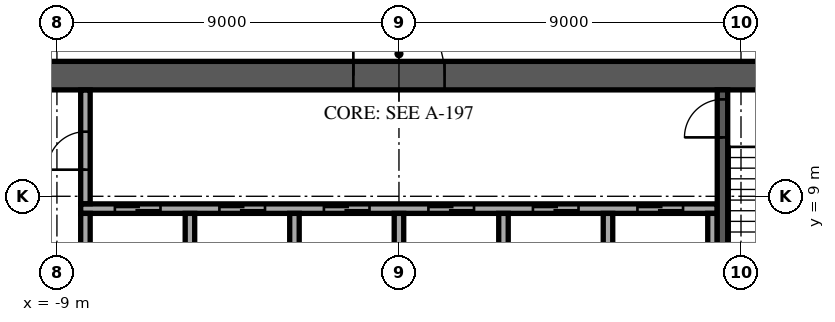
"""IFC4 building model, lengths in metres.
Left out: names, types, materials, properties, quantities, classifications, styles, units other than length and angle.
Written with IfcOpenShell. Run it as: python <this file> out.ifc"""

import sys

from ifc_helpers import new_model, si_unit, direction, frame, frame_2d, origin, place, context, subcontext, project, spatial, rectangle, extrude, element, fill, save


model = new_model("IFC4")
c1 = context("Model", 3, precision=1e-05, world=origin(), true_north=direction((0.0, 1.0)))
c2 = subcontext(c1, "Body", "Model", "MODEL_VIEW")
j1 = project(units=[si_unit("LENGTHUNIT", "METRE"), si_unit("PLANEANGLEUNIT", "RADIAN")], contexts=[c1])
p1 = place(None, origin())
s1 = spatial("IfcSite", under=j1, at=p1, CompositionType="ELEMENT")
p2 = place(p1, origin())
s2 = spatial("IfcBuilding", under=s1, at=p2, CompositionType="ELEMENT")
p3 = place(p2, frame((0.0, 0.0, 254.9)))
s3 = spatial("IfcBuildingStorey", under=s2, at=p3, CompositionType="ELEMENT", Elevation=254.9)
p4 = place(p3, frame((-12.55, 12.175, 0.0), z_axis=(0.0, 0.0, 1.0), x_axis=(1.0, 0.0, 0.0)))
e1 = element("IfcWall", 1, at=p4, inside=s3, PredefinedType="SHEAR", context=c2, shape_type="SweptSolid", body=[
    extrude(rectangle(XDim=25.1, YDim=0.75, at=frame_2d((12.55, 0.0))), origin(), (0.0, 0.0, 1.0), 3.64),
])
p5 = place(p4, frame((11.35, 0.0, 0.0)))
e2 = element("IfcOpeningElement", 2, at=p5, cuts=e1, PredefinedType="OPENING", context=c2, shape_type="SweptSolid", body=[
    extrude(rectangle(XDim=2.4, YDim=2.4, at=frame_2d((1.2, 1.2))), frame((0.0, 0.385, 0.0), z_axis=(0.0, -1.0, 0.0), x_axis=(1.0, 0.0, 0.0)), (0.0, 0.0, 1.0), 0.77),
])
p6 = place(p4, frame((22.175, 0.0, 0.0)))
e3 = element("IfcOpeningElement", 3, at=p6, cuts=e1, PredefinedType="OPENING", context=c2, shape_type="SweptSolid", body=[
    extrude(rectangle(XDim=1.2, YDim=2.1, at=frame_2d((0.6, 1.05))), frame((0.0, 0.385, 0.0), z_axis=(0.0, -1.0, 0.0), x_axis=(1.0, 0.0, 0.0)), (0.0, 0.0, 1.0), 0.77),
])
p7 = place(p4, frame((1.15, 0.0, 0.0)))
e4 = element("IfcOpeningElement", 4, at=p7, cuts=e1, PredefinedType="OPENING", context=c2, shape_type="SweptSolid", body=[
    extrude(rectangle(XDim=1.0, YDim=2.1, at=frame_2d((0.5, 1.05))), frame((0.0, 0.385, 0.0), z_axis=(0.0, -1.0, 0.0), x_axis=(1.0, 0.0, 0.0)), (0.0, 0.0, 1.0), 0.77),
])
p8 = place(p3, frame((-8.375, 8.675, 0.0), z_axis=(0.0, 0.0, 1.0), x_axis=(1.0, 0.0, 0.0)))
e5 = element("IfcWall", 5, at=p8, inside=s3, PredefinedType="SOLIDWALL", context=c2, shape_type="SweptSolid", body=[
    extrude(rectangle(XDim=16.75, YDim=0.25, at=frame_2d((8.375, 0.0))), origin(), (0.0, 0.0, 1.0), 3.64),
])
p9 = place(p8, frame((0.9, 0.0, 0.0)))
e6 = element("IfcOpeningElement", 6, at=p9, cuts=e5, PredefinedType="OPENING", context=c2, shape_type="SweptSolid", body=[
    extrude(rectangle(XDim=1.2, YDim=2.1, at=frame_2d((0.6, 1.05))), frame((0.0, 0.135, 0.0), z_axis=(0.0, -1.0, 0.0), x_axis=(1.0, 0.0, 0.0)), (0.0, 0.0, 1.0), 0.27),
])
p10 = place(p8, frame((3.65, 0.0, 0.0)))
e7 = element("IfcOpeningElement", 7, at=p10, cuts=e5, PredefinedType="OPENING", context=c2, shape_type="SweptSolid", body=[
    extrude(rectangle(XDim=1.2, YDim=2.1, at=frame_2d((0.6, 1.05))), frame((0.0, 0.135, 0.0), z_axis=(0.0, -1.0, 0.0), x_axis=(1.0, 0.0, 0.0)), (0.0, 0.0, 1.0), 0.27),
])
p11 = place(p8, frame((6.4, 0.0, 0.0)))
e8 = element("IfcOpeningElement", 8, at=p11, cuts=e5, PredefinedType="OPENING", context=c2, shape_type="SweptSolid", body=[
    extrude(rectangle(XDim=1.2, YDim=2.1, at=frame_2d((0.6, 1.05))), frame((0.0, 0.135, 0.0), z_axis=(0.0, -1.0, 0.0), x_axis=(1.0, 0.0, 0.0)), (0.0, 0.0, 1.0), 0.27),
])
p12 = place(p8, frame((9.15, 0.0, 0.0)))
e9 = element("IfcOpeningElement", 9, at=p12, cuts=e5, PredefinedType="OPENING", context=c2, shape_type="SweptSolid", body=[
    extrude(rectangle(XDim=1.2, YDim=2.1, at=frame_2d((0.6, 1.05))), frame((0.0, 0.135, 0.0), z_axis=(0.0, -1.0, 0.0), x_axis=(1.0, 0.0, 0.0)), (0.0, 0.0, 1.0), 0.27),
])
p13 = place(p8, frame((11.9, 0.0, 0.0)))
e10 = element("IfcOpeningElement", 10, at=p13, cuts=e5, PredefinedType="OPENING", context=c2, shape_type="SweptSolid", body=[
    extrude(rectangle(XDim=1.2, YDim=2.1, at=frame_2d((0.6, 1.05))), frame((0.0, 0.135, 0.0), z_axis=(0.0, -1.0, 0.0), x_axis=(1.0, 0.0, 0.0)), (0.0, 0.0, 1.0), 0.27),
])
p14 = place(p8, frame((14.65, 0.0, 0.0)))
e11 = element("IfcOpeningElement", 11, at=p14, cuts=e5, PredefinedType="OPENING", context=c2, shape_type="SweptSolid", body=[
    extrude(rectangle(XDim=1.2, YDim=2.1, at=frame_2d((0.6, 1.05))), frame((0.0, 0.135, 0.0), z_axis=(0.0, -1.0, 0.0), x_axis=(1.0, 0.0, 0.0)), (0.0, 0.0, 1.0), 0.27),
])
for number, where, z_axis, x_axis in (
    (12, (-8.25, 5.85, 0.0), (0.0, 0.0, 1.0), (0.0, 1.0, 0.0)),
    (13, (-5.5, 5.85, 0.0), (0.0, 0.0, 1.0), (0.0, 1.0, 0.0)),
    (14, (-2.75, 5.85, 0.0), (0.0, 0.0, 1.0), (0.0, 1.0, 0.0)),
    (15, (0.0, 5.85, 0.0), (0.0, 0.0, 1.0), (0.0, 1.0, 0.0)),
    (16, (2.75, 5.85, 0.0), (0.0, 0.0, 1.0), (0.0, 1.0, 0.0)),
    (17, (5.5, 5.85, 0.0), (0.0, 0.0, 1.0), (0.0, 1.0, 0.0)),
    (18, (8.25, 5.85, 0.0), (0.0, 0.0, 1.0), (0.0, 1.0, 0.0)),
):
    element("IfcWall", number, at=place(p3, frame(where, z_axis=z_axis, x_axis=x_axis)), inside=s3, PredefinedType="SOLIDWALL", context=c2, shape_type="SweptSolid", body=[
        extrude(rectangle(XDim=2.7, YDim=0.25, at=frame_2d((1.35, 0.0))), origin(), (0.0, 0.0, 1.0), 3.64),
    ])
p15 = place(p3, frame((8.512, 4.55, 0.0), z_axis=(0.0, 0.0, 1.0), x_axis=(0.0, 1.0, 0.0)))
e19 = element("IfcWall", 19, at=p15, inside=s3, PredefinedType="SOLIDWALL", context=c2, shape_type="SweptSolid", body=[
    extrude(rectangle(XDim=7.25, YDim=0.275, at=frame_2d((3.625, 0.0))), origin(), (0.0, 0.0, 1.0), 3.64),
])
p16 = place(p15, frame((6.0, 0.0, 0.0)))
e20 = element("IfcOpeningElement", 20, at=p16, cuts=e19, PredefinedType="OPENING", context=c2, shape_type="SweptSolid", body=[
    extrude(rectangle(XDim=1.0, YDim=2.1, at=frame_2d((0.5, 1.05))), frame((0.0, 0.147, 0.0), z_axis=(0.0, -1.0, 0.0), x_axis=(1.0, 0.0, 0.0)), (0.0, 0.0, 1.0), 0.295),
])
p17 = place(p3, frame((-8.25, 8.805, 0.0), z_axis=(0.0, 0.0, 1.0), x_axis=(0.0, 1.0, 0.0)))
e21 = element("IfcWall", 21, at=p17, inside=s3, PredefinedType="PARTITIONING", context=c2, shape_type="SweptSolid", body=[
    extrude(rectangle(XDim=2.99, YDim=0.25, at=frame_2d((1.495, 0.0))), origin(), (0.0, 0.0, 1.0), 3.64),
])
p18 = place(p17, frame((0.895, 0.0, 0.0)))
e22 = element("IfcOpeningElement", 22, at=p18, cuts=e21, PredefinedType="OPENING", context=c2, shape_type="SweptSolid", body=[
    extrude(rectangle(XDim=1.0, YDim=2.1, at=frame_2d((0.5, 1.05))), frame((0.0, 0.135, 0.0), z_axis=(0.0, -1.0, 0.0), x_axis=(1.0, 0.0, 0.0)), (0.0, 0.0, 1.0), 0.27),
])
p19 = place(p3, frame((-6.281, 33.292, 0.0), z_axis=(0.0, 0.0, 1.0), x_axis=(-0.544637268583, -0.838671715077, 0.0)))
e23 = element("IfcWall", 23, at=p19, inside=s3, PredefinedType="STANDARD", context=c2, shape_type="SweptSolid", body=[
    extrude(rectangle(XDim=48.843, YDim=0.6, at=frame_2d((24.422, 0.0))), origin(), (0.0, 0.0, 1.0), 3.64),
])
p20 = place(p19, frame((1.22, 0.0, 0.9)))
e24 = element("IfcOpeningElement", 24, at=p20, cuts=e23, PredefinedType="OPENING", context=c2, shape_type="SweptSolid", body=[
    extrude(rectangle(XDim=2.0, YDim=2.1, at=frame_2d((1.0, 1.05))), frame((0.0, 0.31, 0.0), z_axis=(0.0, -1.0, 0.0), x_axis=(1.0, 0.0, 0.0)), (0.0, 0.0, 1.0), 0.62),
])
p21 = place(p19, frame((5.66, 0.0, 0.9)))
e25 = element("IfcOpeningElement", 25, at=p21, cuts=e23, PredefinedType="OPENING", context=c2, shape_type="SweptSolid", body=[
    extrude(rectangle(XDim=2.0, YDim=2.1, at=frame_2d((1.0, 1.05))), frame((0.0, 0.31, 0.0), z_axis=(0.0, -1.0, 0.0), x_axis=(1.0, 0.0, 0.0)), (0.0, 0.0, 1.0), 0.62),
])
p22 = place(p19, frame((14.541, 0.0, 0.9)))
e26 = element("IfcOpeningElement", 26, at=p22, cuts=e23, PredefinedType="OPENING", context=c2, shape_type="SweptSolid", body=[
    extrude(rectangle(XDim=2.0, YDim=2.1, at=frame_2d((1.0, 1.05))), frame((0.0, 0.31, 0.0), z_axis=(0.0, -1.0, 0.0), x_axis=(1.0, 0.0, 0.0)), (0.0, 0.0, 1.0), 0.62),
])
p23 = place(p19, frame((18.981, 0.0, 0.9)))
e27 = element("IfcOpeningElement", 27, at=p23, cuts=e23, PredefinedType="OPENING", context=c2, shape_type="SweptSolid", body=[
    extrude(rectangle(XDim=2.0, YDim=2.1, at=frame_2d((1.0, 1.05))), frame((0.0, 0.31, 0.0), z_axis=(0.0, -1.0, 0.0), x_axis=(1.0, 0.0, 0.0)), (0.0, 0.0, 1.0), 0.62),
])
p24 = place(p19, frame((23.422, 0.0, 0.9)))
e28 = element("IfcOpeningElement", 28, at=p24, cuts=e23, PredefinedType="OPENING", context=c2, shape_type="SweptSolid", body=[
    extrude(rectangle(XDim=2.0, YDim=2.1, at=frame_2d((1.0, 1.05))), frame((0.0, 0.31, 0.0), z_axis=(0.0, -1.0, 0.0), x_axis=(1.0, 0.0, 0.0)), (0.0, 0.0, 1.0), 0.62),
])
p25 = place(p19, frame((27.862, 0.0, 0.9)))
e29 = element("IfcOpeningElement", 29, at=p25, cuts=e23, PredefinedType="OPENING", context=c2, shape_type="SweptSolid", body=[
    extrude(rectangle(XDim=2.0, YDim=2.1, at=frame_2d((1.0, 1.05))), frame((0.0, 0.31, 0.0), z_axis=(0.0, -1.0, 0.0), x_axis=(1.0, 0.0, 0.0)), (0.0, 0.0, 1.0), 0.62),
])
p26 = place(p19, frame((32.302, 0.0, 0.9)))
e30 = element("IfcOpeningElement", 30, at=p26, cuts=e23, PredefinedType="OPENING", context=c2, shape_type="SweptSolid", body=[
    extrude(rectangle(XDim=2.0, YDim=2.1, at=frame_2d((1.0, 1.05))), frame((0.0, 0.31, 0.0), z_axis=(0.0, -1.0, 0.0), x_axis=(1.0, 0.0, 0.0)), (0.0, 0.0, 1.0), 0.62),
])
p27 = place(p19, frame((36.742, 0.0, 0.9)))
e31 = element("IfcOpeningElement", 31, at=p27, cuts=e23, PredefinedType="OPENING", context=c2, shape_type="SweptSolid", body=[
    extrude(rectangle(XDim=2.0, YDim=2.1, at=frame_2d((1.0, 1.05))), frame((0.0, 0.31, 0.0), z_axis=(0.0, -1.0, 0.0), x_axis=(1.0, 0.0, 0.0)), (0.0, 0.0, 1.0), 0.62),
])
p28 = place(p19, frame((41.183, 0.0, 0.9)))
e32 = element("IfcOpeningElement", 32, at=p28, cuts=e23, PredefinedType="OPENING", context=c2, shape_type="SweptSolid", body=[
    extrude(rectangle(XDim=2.0, YDim=2.1, at=frame_2d((1.0, 1.05))), frame((0.0, 0.31, 0.0), z_axis=(0.0, -1.0, 0.0), x_axis=(1.0, 0.0, 0.0)), (0.0, 0.0, 1.0), 0.62),
])
p29 = place(p19, frame((45.623, 0.0, 0.9)))
e33 = element("IfcOpeningElement", 33, at=p29, cuts=e23, PredefinedType="OPENING", context=c2, shape_type="SweptSolid", body=[
    extrude(rectangle(XDim=2.0, YDim=2.1, at=frame_2d((1.0, 1.05))), frame((0.0, 0.31, 0.0), z_axis=(0.0, -1.0, 0.0), x_axis=(1.0, 0.0, 0.0)), (0.0, 0.0, 1.0), 0.62),
])
p30 = place(p3, frame((6.367, -33.16, 0.0), z_axis=(0.0, 0.0, 1.0), x_axis=(0.544637371147, 0.838671648472, 0.0)))
e34 = element("IfcWall", 34, at=p30, inside=s3, PredefinedType="STANDARD", context=c2, shape_type="SweptSolid", body=[
    extrude(rectangle(XDim=48.686, YDim=0.6, at=frame_2d((24.343, 0.0))), origin(), (0.0, 0.0, 1.0), 3.64),
])
p31 = place(p30, frame((1.213, 0.0, 0.9)))
e35 = element("IfcOpeningElement", 35, at=p31, cuts=e34, PredefinedType="OPENING", context=c2, shape_type="SweptSolid", body=[
    extrude(rectangle(XDim=2.0, YDim=2.1, at=frame_2d((1.0, 1.05))), frame((0.0, 0.31, 0.0), z_axis=(0.0, -1.0, 0.0), x_axis=(1.0, 0.0, 0.0)), (0.0, 0.0, 1.0), 0.62),
])
p32 = place(p30, frame((5.639, 0.0, 0.9)))
e36 = element("IfcOpeningElement", 36, at=p32, cuts=e34, PredefinedType="OPENING", context=c2, shape_type="SweptSolid", body=[
    extrude(rectangle(XDim=2.0, YDim=2.1, at=frame_2d((1.0, 1.05))), frame((0.0, 0.31, 0.0), z_axis=(0.0, -1.0, 0.0), x_axis=(1.0, 0.0, 0.0)), (0.0, 0.0, 1.0), 0.62),
])
p33 = place(p30, frame((14.491, 0.0, 0.9)))
e37 = element("IfcOpeningElement", 37, at=p33, cuts=e34, PredefinedType="OPENING", context=c2, shape_type="SweptSolid", body=[
    extrude(rectangle(XDim=2.0, YDim=2.1, at=frame_2d((1.0, 1.05))), frame((0.0, 0.31, 0.0), z_axis=(0.0, -1.0, 0.0), x_axis=(1.0, 0.0, 0.0)), (0.0, 0.0, 1.0), 0.62),
])
p34 = place(p30, frame((18.917, 0.0, 0.9)))
e38 = element("IfcOpeningElement", 38, at=p34, cuts=e34, PredefinedType="OPENING", context=c2, shape_type="SweptSolid", body=[
    extrude(rectangle(XDim=2.0, YDim=2.1, at=frame_2d((1.0, 1.05))), frame((0.0, 0.31, 0.0), z_axis=(0.0, -1.0, 0.0), x_axis=(1.0, 0.0, 0.0)), (0.0, 0.0, 1.0), 0.62),
])
p35 = place(p30, frame((23.343, 0.0, 0.9)))
e39 = element("IfcOpeningElement", 39, at=p35, cuts=e34, PredefinedType="OPENING", context=c2, shape_type="SweptSolid", body=[
    extrude(rectangle(XDim=2.0, YDim=2.1, at=frame_2d((1.0, 1.05))), frame((0.0, 0.31, 0.0), z_axis=(0.0, -1.0, 0.0), x_axis=(1.0, 0.0, 0.0)), (0.0, 0.0, 1.0), 0.62),
])
p36 = place(p30, frame((27.769, 0.0, 0.9)))
e40 = element("IfcOpeningElement", 40, at=p36, cuts=e34, PredefinedType="OPENING", context=c2, shape_type="SweptSolid", body=[
    extrude(rectangle(XDim=2.0, YDim=2.1, at=frame_2d((1.0, 1.05))), frame((0.0, 0.31, 0.0), z_axis=(0.0, -1.0, 0.0), x_axis=(1.0, 0.0, 0.0)), (0.0, 0.0, 1.0), 0.62),
])
p37 = place(p30, frame((32.195, 0.0, 0.9)))
e41 = element("IfcOpeningElement", 41, at=p37, cuts=e34, PredefinedType="OPENING", context=c2, shape_type="SweptSolid", body=[
    extrude(rectangle(XDim=2.0, YDim=2.1, at=frame_2d((1.0, 1.05))), frame((0.0, 0.31, 0.0), z_axis=(0.0, -1.0, 0.0), x_axis=(1.0, 0.0, 0.0)), (0.0, 0.0, 1.0), 0.62),
])
p38 = place(p30, frame((36.621, 0.0, 0.9)))
e42 = element("IfcOpeningElement", 42, at=p38, cuts=e34, PredefinedType="OPENING", context=c2, shape_type="SweptSolid", body=[
    extrude(rectangle(XDim=2.0, YDim=2.1, at=frame_2d((1.0, 1.05))), frame((0.0, 0.31, 0.0), z_axis=(0.0, -1.0, 0.0), x_axis=(1.0, 0.0, 0.0)), (0.0, 0.0, 1.0), 0.62),
])
p39 = place(p30, frame((41.047, 0.0, 0.9)))
e43 = element("IfcOpeningElement", 43, at=p39, cuts=e34, PredefinedType="OPENING", context=c2, shape_type="SweptSolid", body=[
    extrude(rectangle(XDim=2.0, YDim=2.1, at=frame_2d((1.0, 1.05))), frame((0.0, 0.31, 0.0), z_axis=(0.0, -1.0, 0.0), x_axis=(1.0, 0.0, 0.0)), (0.0, 0.0, 1.0), 0.62),
])
p40 = place(p30, frame((45.473, 0.0, 0.9)))
e44 = element("IfcOpeningElement", 44, at=p40, cuts=e34, PredefinedType="OPENING", context=c2, shape_type="SweptSolid", body=[
    extrude(rectangle(XDim=2.0, YDim=2.1, at=frame_2d((1.0, 1.05))), frame((0.0, 0.31, 0.0), z_axis=(0.0, -1.0, 0.0), x_axis=(1.0, 0.0, 0.0)), (0.0, 0.0, 1.0), 0.62),
])
p41 = place(p3, frame((-6.127, 26.598, 0.0), z_axis=(0.0, 0.0, 1.0), x_axis=(0.838670911559, -0.544638505897, 0.0)))
e45 = element("IfcWall", 45, at=p41, inside=s3, PredefinedType="PARTITIONING", context=c2, shape_type="SweptSolid", body=[
    extrude(rectangle(XDim=39.325, YDim=0.15, at=frame_2d((19.663, 0.0))), origin(), (0.0, 0.0, 1.0), 3.04),
])
p42 = place(p41, frame((9.3, 0.0, 0.0)))
e46 = element("IfcOpeningElement", 46, at=p42, cuts=e45, PredefinedType="OPENING", context=c2, shape_type="SweptSolid", body=[
    extrude(rectangle(XDim=1.8, YDim=2.1, at=frame_2d((0.9, 1.05))), frame((0.0, 0.085, 0.0), z_axis=(0.0, -1.0, 0.0), x_axis=(1.0, 0.0, 0.0)), (0.0, 0.0, 1.0), 0.17),
])
p43 = place(p41, frame((12.185, 0.0, 0.0)))
e47 = element("IfcOpeningElement", 47, at=p43, cuts=e45, PredefinedType="OPENING", context=c2, shape_type="SweptSolid", body=[
    extrude(rectangle(XDim=1.0, YDim=2.1, at=frame_2d((0.5, 1.05))), frame((0.0, 0.085, 0.0), z_axis=(0.0, -1.0, 0.0), x_axis=(1.0, 0.0, 0.0)), (0.0, 0.0, 1.0), 0.17),
])
p44 = place(p41, frame((23.155, 0.0, 0.0)))
e48 = element("IfcOpeningElement", 48, at=p44, cuts=e45, PredefinedType="OPENING", context=c2, shape_type="SweptSolid", body=[
    extrude(rectangle(XDim=1.0, YDim=2.1, at=frame_2d((0.5, 1.05))), frame((0.0, 0.085, 0.0), z_axis=(0.0, -1.0, 0.0), x_axis=(1.0, 0.0, 0.0)), (0.0, 0.0, 1.0), 0.17),
])
p45 = place(p41, frame((30.544, 0.0, 0.0)))
e49 = element("IfcOpeningElement", 49, at=p45, cuts=e45, PredefinedType="OPENING", context=c2, shape_type="SweptSolid", body=[
    extrude(rectangle(XDim=1.0, YDim=2.1, at=frame_2d((0.5, 1.05))), frame((0.0, 0.085, 0.0), z_axis=(0.0, -1.0, 0.0), x_axis=(1.0, 0.0, 0.0)), (0.0, 0.0, 1.0), 0.17),
])
p46 = place(p41, frame((36.099, 0.0, 0.0)))
e50 = element("IfcOpeningElement", 50, at=p46, cuts=e45, PredefinedType="OPENING", context=c2, shape_type="SweptSolid", body=[
    extrude(rectangle(XDim=1.0, YDim=2.1, at=frame_2d((0.5, 1.05))), frame((0.0, 0.085, 0.0), z_axis=(0.0, -1.0, 0.0), x_axis=(1.0, 0.0, 0.0)), (0.0, 0.0, 1.0), 0.17),
])
p47 = place(p5, origin())
e51 = element("IfcDoor", 51, at=p47, inside=s3, OperationType="SINGLE_SWING_LEFT", PredefinedType="DOOR", context=c2, shape_type="SweptSolid", body=[
    extrude(rectangle(XDim=2.4, YDim=2.4, at=frame_2d((1.2, 1.2))), frame((0.0, 0.025, 0.0), z_axis=(0.0, -1.0, 0.0), x_axis=(1.0, 0.0, 0.0)), (0.0, 0.0, 1.0), 0.05),
])
fill(e2, e51)
p48 = place(p9, origin())
e52 = element("IfcDoor", 52, at=p48, inside=s3, OperationType="DOUBLE_DOOR_SLIDING", PredefinedType="DOOR", context=c2, shape_type="SweptSolid", body=[
    extrude(rectangle(XDim=1.2, YDim=2.1, at=frame_2d((0.6, 1.05))), frame((0.0, 0.025, 0.0), z_axis=(0.0, -1.0, 0.0), x_axis=(1.0, 0.0, 0.0)), (0.0, 0.0, 1.0), 0.05),
])
fill(e6, e52)
p49 = place(p10, origin())
e53 = element("IfcDoor", 53, at=p49, inside=s3, OperationType="DOUBLE_DOOR_SLIDING", PredefinedType="DOOR", context=c2, shape_type="SweptSolid", body=[
    extrude(rectangle(XDim=1.2, YDim=2.1, at=frame_2d((0.6, 1.05))), frame((0.0, 0.025, 0.0), z_axis=(0.0, -1.0, 0.0), x_axis=(1.0, 0.0, 0.0)), (0.0, 0.0, 1.0), 0.05),
])
fill(e7, e53)
p50 = place(p11, origin())
e54 = element("IfcDoor", 54, at=p50, inside=s3, OperationType="DOUBLE_DOOR_SLIDING", PredefinedType="DOOR", context=c2, shape_type="SweptSolid", body=[
    extrude(rectangle(XDim=1.2, YDim=2.1, at=frame_2d((0.6, 1.05))), frame((0.0, 0.025, 0.0), z_axis=(0.0, -1.0, 0.0), x_axis=(1.0, 0.0, 0.0)), (0.0, 0.0, 1.0), 0.05),
])
fill(e8, e54)
p51 = place(p12, origin())
e55 = element("IfcDoor", 55, at=p51, inside=s3, OperationType="DOUBLE_DOOR_SLIDING", PredefinedType="DOOR", context=c2, shape_type="SweptSolid", body=[
    extrude(rectangle(XDim=1.2, YDim=2.1, at=frame_2d((0.6, 1.05))), frame((0.0, 0.025, 0.0), z_axis=(0.0, -1.0, 0.0), x_axis=(1.0, 0.0, 0.0)), (0.0, 0.0, 1.0), 0.05),
])
fill(e9, e55)
p52 = place(p13, origin())
e56 = element("IfcDoor", 56, at=p52, inside=s3, OperationType="DOUBLE_DOOR_SLIDING", PredefinedType="DOOR", context=c2, shape_type="SweptSolid", body=[
    extrude(rectangle(XDim=1.2, YDim=2.1, at=frame_2d((0.6, 1.05))), frame((0.0, 0.025, 0.0), z_axis=(0.0, -1.0, 0.0), x_axis=(1.0, 0.0, 0.0)), (0.0, 0.0, 1.0), 0.05),
])
fill(e10, e56)
p53 = place(p14, origin())
e57 = element("IfcDoor", 57, at=p53, inside=s3, OperationType="DOUBLE_DOOR_SLIDING", PredefinedType="DOOR", context=c2, shape_type="SweptSolid", body=[
    extrude(rectangle(XDim=1.2, YDim=2.1, at=frame_2d((0.6, 1.05))), frame((0.0, 0.025, 0.0), z_axis=(0.0, -1.0, 0.0), x_axis=(1.0, 0.0, 0.0)), (0.0, 0.0, 1.0), 0.05),
])
fill(e11, e57)
p54 = place(p16, origin())
e58 = element("IfcDoor", 58, at=p54, inside=s3, OperationType="SINGLE_SWING_LEFT", PredefinedType="DOOR", context=c2, shape_type="SweptSolid", body=[
    extrude(rectangle(XDim=1.0, YDim=2.1, at=frame_2d((0.5, 1.05))), frame((0.0, 0.025, 0.0), z_axis=(0.0, -1.0, 0.0), x_axis=(1.0, 0.0, 0.0)), (0.0, 0.0, 1.0), 0.05),
])
fill(e20, e58)
p55 = place(p18, origin())
e59 = element("IfcDoor", 59, at=p55, inside=s3, OperationType="SINGLE_SWING_LEFT", PredefinedType="DOOR", context=c2, shape_type="SweptSolid", body=[
    extrude(rectangle(XDim=1.0, YDim=2.1, at=frame_2d((0.5, 1.05))), frame((0.0, 0.025, 0.0), z_axis=(0.0, -1.0, 0.0), x_axis=(1.0, 0.0, 0.0)), (0.0, 0.0, 1.0), 0.05),
])
fill(e22, e59)
save(model, sys.argv[1])
